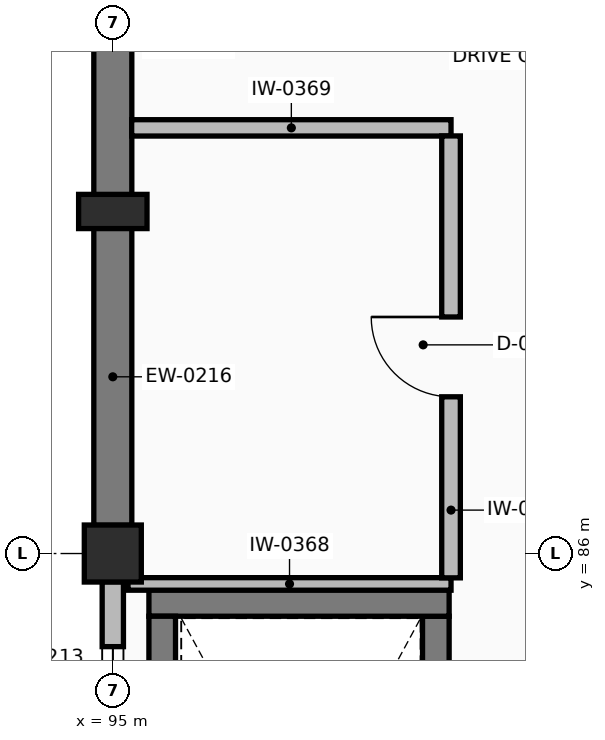
"""IFC4 building model, lengths in metres.
Left out: names, types, materials, properties, quantities, classifications, styles, units other than length and angle.
Written with IfcOpenShell. Run it as: python <this file> out.ifc"""

import sys

from ifc_helpers import new_model, si_unit, direction, frame, frame_2d, origin, origin_2d, place, context, subcontext, project, spatial, rectangle, extrude, element, fill, save


model = new_model("IFC4")
c1 = context("Model", 3, precision=1e-05, world=origin(), true_north=direction((0.0, 1.0)))
c2 = subcontext(c1, "Body", "Model", "MODEL_VIEW")
j1 = project(units=[si_unit("LENGTHUNIT", "METRE"), si_unit("PLANEANGLEUNIT", "RADIAN")], contexts=[c1])
p1 = place(None, origin())
s1 = spatial("IfcSite", under=j1, at=p1, CompositionType="ELEMENT")
p2 = place(p1, origin())
s2 = spatial("IfcBuilding", under=s1, at=p2, CompositionType="ELEMENT")
p3 = place(p2, frame((0.0, 0.0, 4.8)))
s3 = spatial("IfcBuildingStorey", under=s2, at=p3, CompositionType="ELEMENT", Elevation=4.8)
p4 = place(p3, frame((95.0, 86.0, 0.0), z_axis=(0.0, 0.0, 1.0), x_axis=(1.0, 0.0, 0.0)))
e1 = element("IfcColumn", 1, at=p4, inside=s3, PredefinedType="COLUMN", context=c2, shape_type="SweptSolid", body=[
    extrude(rectangle(XDim=0.75, YDim=0.75, at=origin_2d()), origin(), (0.0, 0.0, 1.0), 4.8),
])
p5 = place(p3, frame((95.0, 90.5, 0.0), z_axis=(0.0, 0.0, 1.0), x_axis=(0.0, 1.0, 0.0)))
e2 = element("IfcColumn", 2, at=p5, inside=s3, PredefinedType="PILASTER", context=c2, shape_type="SweptSolid", body=[
    extrude(rectangle(XDim=0.45, YDim=0.9, at=origin_2d()), origin(), (0.0, 0.0, 1.0), 4.8),
])
p6 = place(p3, frame((95.0, 85.63, 0.0), z_axis=(0.0, 0.0, 1.0), x_axis=(0.0, -1.0, 0.0)))
e3 = element("IfcWall", 3, at=p6, inside=s3, PredefinedType="SOLIDWALL", context=c2, shape_type="SweptSolid", body=[
    extrude(rectangle(XDim=3.91, YDim=0.28, at=frame_2d((1.955, 0.0))), origin(), (0.0, 0.0, 1.0), 3.245),
])
p7 = place(p6, frame((0.855, 0.0, 0.9)))
e4 = element("IfcOpeningElement", 4, at=p7, cuts=e3, PredefinedType="OPENING", context=c2, shape_type="SweptSolid", body=[
    extrude(rectangle(XDim=2.2, YDim=1.4, at=frame_2d((1.1, 0.7))), frame((0.0, 0.15, 0.0), z_axis=(0.0, -1.0, 0.0), x_axis=(1.0, 0.0, 0.0)), (0.0, 0.0, 1.0), 0.3),
])
for number, where, z_axis, x_axis in (
    (5, (95.0, 94.63, 0.0), (0.0, 0.0, 1.0), (0.0, -1.0, 0.0)),
    (6, (95.0, 90.28, 0.0), (0.0, 0.0, 1.0), (0.0, -1.0, 0.0)),
):
    element("IfcWall", number, at=place(p3, frame(where, z_axis=z_axis, x_axis=x_axis)), inside=s3, PredefinedType="SHEAR", context=c2, shape_type="SweptSolid", body=[
        extrude(rectangle(XDim=3.91, YDim=0.5, at=frame_2d((1.955, 0.0))), origin(), (0.0, 0.0, 1.0), 3.245),
    ])
p8 = place(p3, frame((99.25, 77.725, 0.0), z_axis=(0.0, 0.0, 1.0), x_axis=(0.0, 1.0, 0.0)))
e7 = element("IfcWall", 7, at=p8, inside=s3, PredefinedType="SHEAR", context=c2, shape_type="SweptSolid", body=[
    extrude(rectangle(XDim=7.45, YDim=0.35, at=frame_2d((3.725, 0.0))), origin(), (0.0, 0.0, 1.0), 4.49),
])
p9 = place(p8, frame((0.35, 0.0, 0.0)))
e8 = element("IfcOpeningElement", 8, at=p9, cuts=e7, PredefinedType="OPENING", context=c2, shape_type="SweptSolid", body=[
    extrude(rectangle(XDim=1.1, YDim=2.2, at=frame_2d((0.55, 1.1))), frame((0.0, 0.185, 0.0), z_axis=(0.0, -1.0, 0.0), x_axis=(1.0, 0.0, 0.0)), (0.0, 0.0, 1.0), 0.37),
])
p10 = place(p3, frame((99.425, 85.35, 0.0), z_axis=(0.0, 0.0, 1.0), x_axis=(-1.0, 0.0, 0.0)))
e9 = element("IfcWall", 9, at=p10, inside=s3, PredefinedType="SHEAR", context=c2, shape_type="SweptSolid", body=[
    extrude(rectangle(XDim=3.95, YDim=0.35, at=frame_2d((1.975, 0.0))), origin(), (0.0, 0.0, 1.0), 4.49),
])
p11 = place(p3, frame((95.65, 85.175, 0.0), z_axis=(0.0, 0.0, 1.0), x_axis=(0.0, -1.0, 0.0)))
e10 = element("IfcWall", 10, at=p11, inside=s3, PredefinedType="SHEAR", context=c2, shape_type="SweptSolid", body=[
    extrude(rectangle(XDim=7.45, YDim=0.35, at=frame_2d((3.725, 0.0))), origin(), (0.0, 0.0, 1.0), 4.49),
])
p12 = place(p3, frame((95.2, 85.6, 0.0), z_axis=(0.0, 0.0, 1.0), x_axis=(1.0, 0.0, 0.0)))
e11 = element("IfcWall", 11, at=p12, inside=s3, PredefinedType="PARTITIONING", context=c2, shape_type="SweptSolid", body=[
    extrude(rectangle(XDim=4.25, YDim=0.165, at=frame_2d((2.125, 0.0))), origin(), (0.0, 0.0, 1.0), 3.235),
])
p13 = place(p3, frame((95.248, 91.6, 0.0), z_axis=(0.0, 0.0, 1.0), x_axis=(1.0, 0.0, 0.0)))
e12 = element("IfcWall", 12, at=p13, inside=s3, PredefinedType="PARTITIONING", context=c2, shape_type="SweptSolid", body=[
    extrude(rectangle(XDim=4.202, YDim=0.215, at=frame_2d((2.101, 0.0))), origin(), (0.0, 0.0, 1.0), 3.235),
])
p14 = place(p3, frame((99.45, 85.68, 0.0), z_axis=(0.0, 0.0, 1.0), x_axis=(0.0, 1.0, 0.0)))
e13 = element("IfcWall", 13, at=p14, inside=s3, PredefinedType="PARTITIONING", context=c2, shape_type="SweptSolid", body=[
    extrude(rectangle(XDim=5.814, YDim=0.245, at=frame_2d((2.907, 0.0))), origin(), (0.0, 0.0, 1.0), 3.235),
])
p15 = place(p14, frame((2.382, 0.0, 0.0)))
e14 = element("IfcOpeningElement", 14, at=p15, cuts=e13, PredefinedType="OPENING", context=c2, shape_type="SweptSolid", body=[
    extrude(rectangle(XDim=1.05, YDim=2.15, at=frame_2d((0.525, 1.075))), frame((0.0, 0.133, 0.0), z_axis=(0.0, -1.0, 0.0), x_axis=(1.0, 0.0, 0.0)), (0.0, 0.0, 1.0), 0.265),
])
p16 = place(p7, origin())
e15 = element("IfcWindow", 15, at=p16, inside=s3, PartitioningType="SINGLE_PANEL", PredefinedType="WINDOW", context=c2, shape_type="SweptSolid", body=[
    extrude(rectangle(XDim=2.2, YDim=1.4, at=frame_2d((1.1, 0.7))), frame((0.0, 0.03, 0.0), z_axis=(0.0, -1.0, 0.0), x_axis=(1.0, 0.0, 0.0)), (0.0, 0.0, 1.0), 0.06),
])
fill(e4, e15)
p17 = place(p15, origin())
e16 = element("IfcDoor", 16, at=p17, inside=s3, OperationType="SINGLE_SWING_RIGHT", PredefinedType="DOOR", context=c2, shape_type="SweptSolid", body=[
    extrude(rectangle(XDim=1.05, YDim=2.15, at=frame_2d((0.525, 1.075))), frame((0.0, 0.025, 0.0), z_axis=(0.0, -1.0, 0.0), x_axis=(1.0, 0.0, 0.0)), (0.0, 0.0, 1.0), 0.05),
])
fill(e14, e16)
save(model, sys.argv[1])
